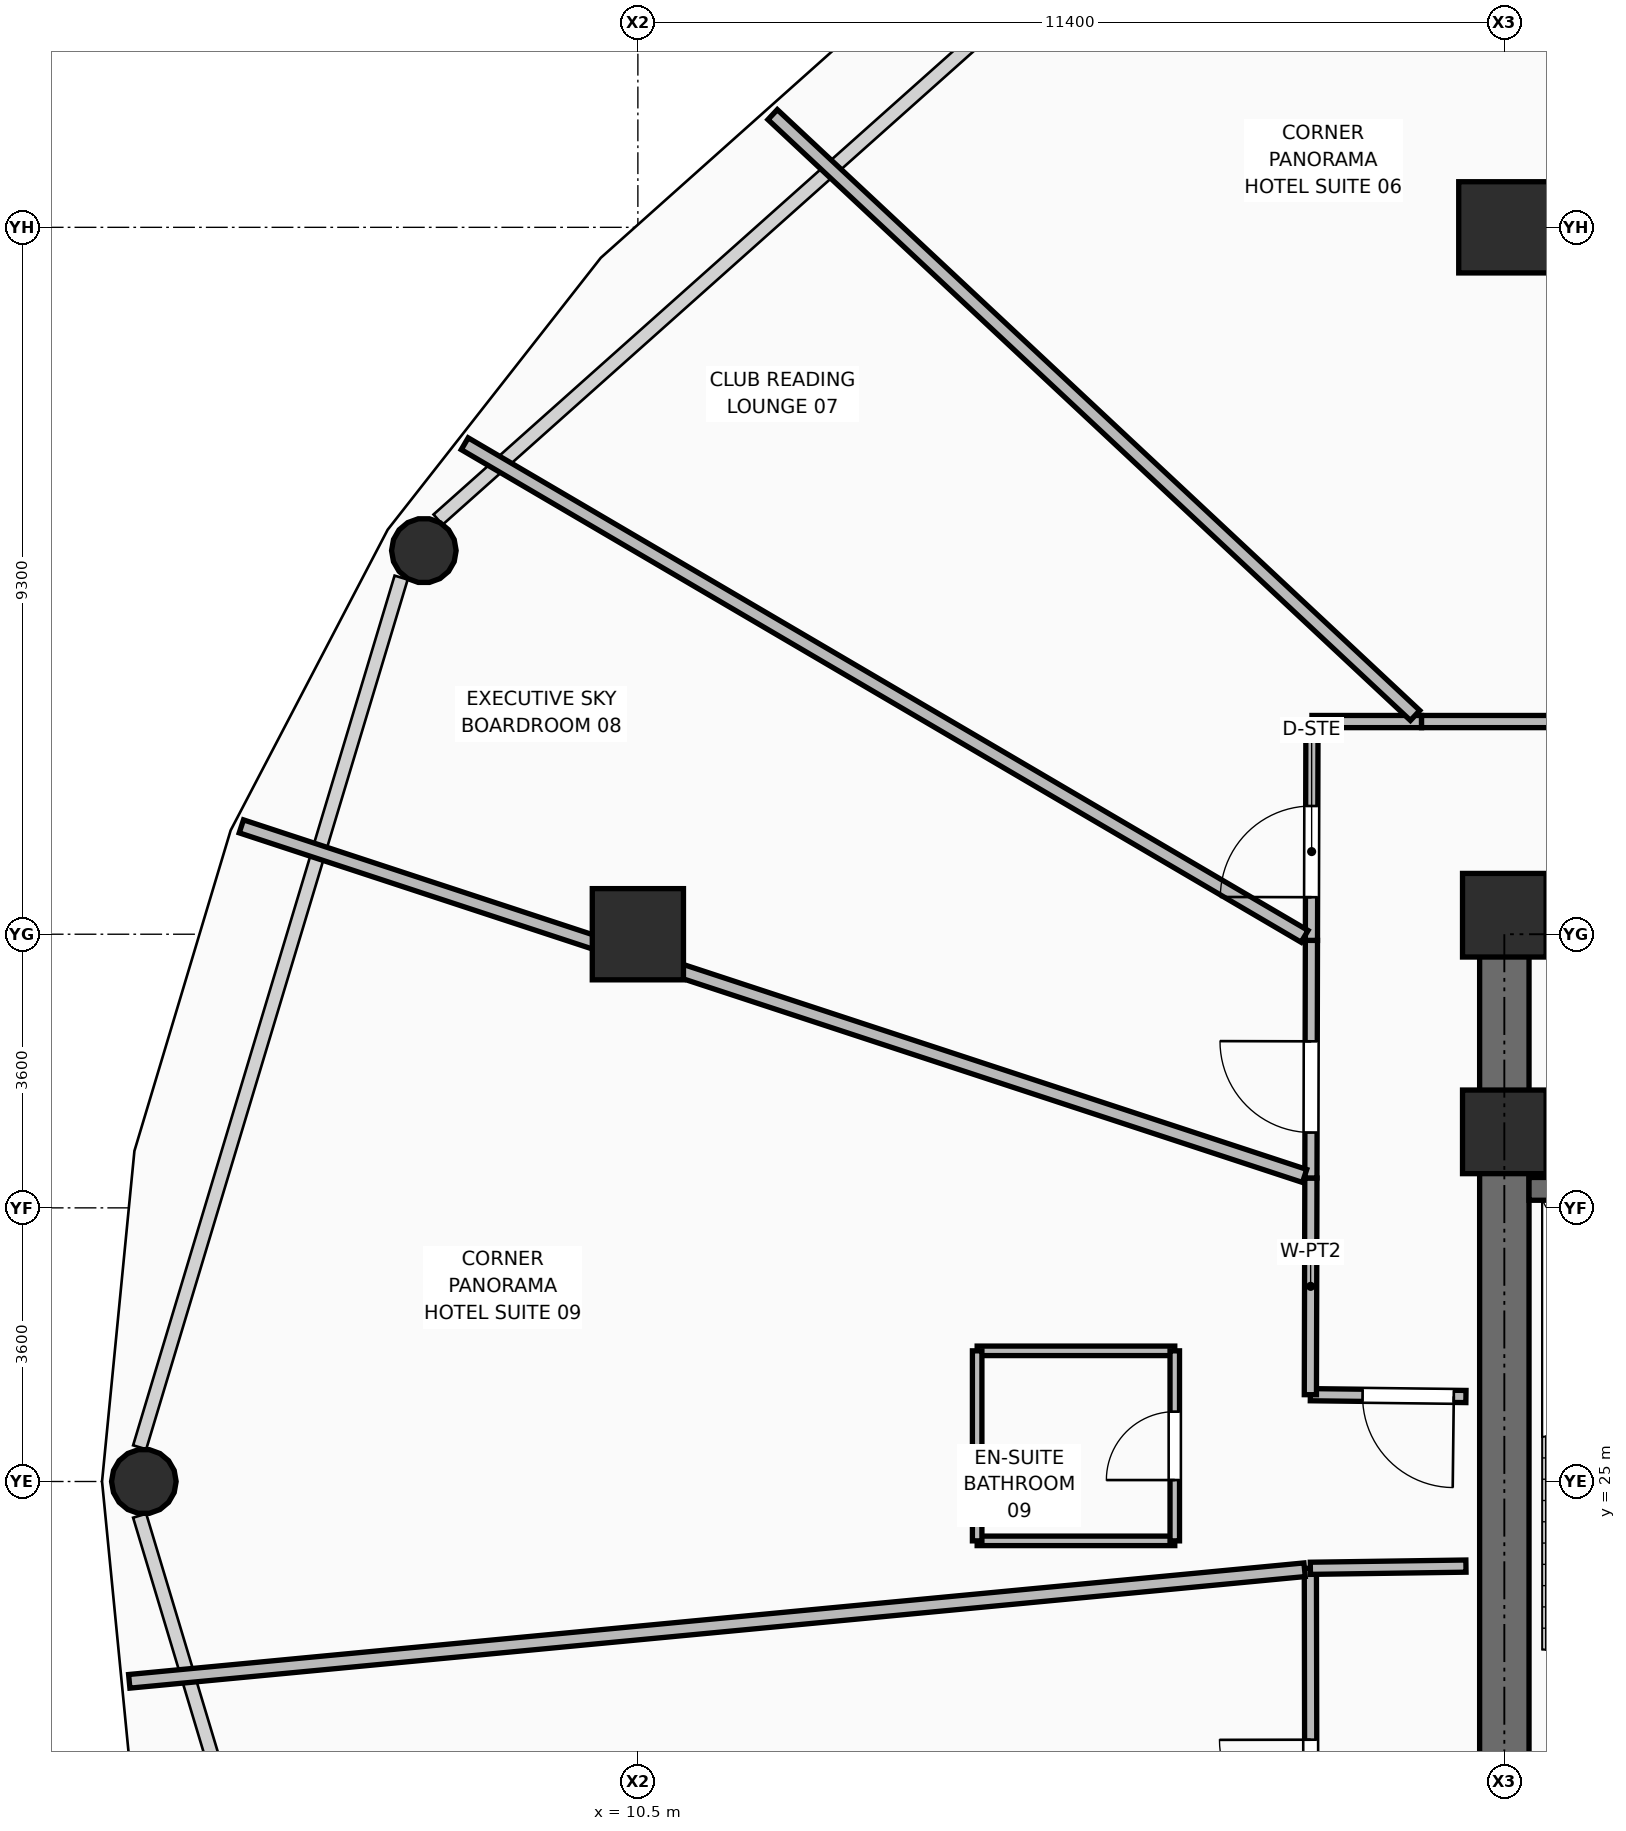
"""IFC4 building model, lengths in metres.
Left out: names, types, materials, properties, quantities, classifications, styles, units other than length and angle.
Written with IfcOpenShell. Run it as: python <this file> out.ifc"""

import sys

from ifc_helpers import new_model, si_unit, direction, frame, frame_2d, origin, origin_2d, place, context, subcontext, project, spatial, rectangle, hollow_rectangle, hollow_circle, extrude, element, fill, save


model = new_model("IFC4")
c1 = context("Model", 3, precision=1e-05, world=origin(), true_north=direction((0.0, 1.0)))
c2 = subcontext(c1, "Body", "Model", "MODEL_VIEW")
j1 = project(units=[si_unit("LENGTHUNIT", "METRE"), si_unit("PLANEANGLEUNIT", "RADIAN")], contexts=[c1])
p1 = place(None, origin())
s1 = spatial("IfcSite", under=j1, at=p1, CompositionType="ELEMENT")
p2 = place(p1, origin())
s2 = spatial("IfcBuilding", under=s1, at=p2, CompositionType="ELEMENT")
p3 = place(p2, frame((0.0, 0.0, 79.5)))
s3 = spatial("IfcBuildingStorey", under=s2, at=p3, CompositionType="ELEMENT", Elevation=79.5)
for number, where, z_axis, x_axis in (
    (1, (21.9, 29.6, 0.0), (0.0, 0.0, 1.0), (1.0, 0.0, 0.0)),
    (2, (21.9, 32.45, 0.0), (0.0, 0.0, 1.0), (1.0, 0.0, 0.0)),
):
    element("IfcColumn", number, at=place(p3, frame(where, z_axis=z_axis, x_axis=x_axis)), inside=s3, PredefinedType="COLUMN", context=c2, shape_type="SweptSolid", body=[
        extrude(rectangle(XDim=1.1, YDim=1.1, at=origin_2d()), origin(), (0.0, 0.0, 1.0), 3.75),
    ])
for number, where, z_axis, x_axis in (
    (3, (10.5, 32.2, 0.0), (0.0, 0.0, 1.0), (1.0, 0.0, 0.0)),
    (4, (21.9, 41.5, 0.0), (0.0, 0.0, 1.0), (1.0, 0.0, 0.0)),
):
    element("IfcColumn", number, at=place(p3, frame(where, z_axis=z_axis, x_axis=x_axis)), inside=s3, PredefinedType="COLUMN", context=c2, shape_type="SweptSolid", body=[
        extrude(hollow_rectangle(XDim=1.2, YDim=1.2, WallThickness=0.045, at=origin_2d()), origin(), (0.0, 0.0, 1.0), 3.75),
    ])
for number, where, z_axis, x_axis in (
    (5, (7.684, 37.247, 0.0), (0.0, 0.0, 1.0), (1.0, 0.0, 0.0)),
    (6, (4.0, 25.0, 0.0), (0.0, 0.0, 1.0), (1.0, 0.0, 0.0)),
):
    element("IfcColumn", number, at=place(p3, frame(where, z_axis=z_axis, x_axis=x_axis)), inside=s3, PredefinedType="COLUMN", context=c2, shape_type="SweptSolid", body=[
        extrude(hollow_circle(Radius=0.425, WallThickness=0.04, at=origin_2d()), origin(), (0.0, 0.0, 1.0), 3.57),
    ])
p4 = place(p3, frame((21.575, 32.45, 0.0), z_axis=(0.0, 0.0, 1.0), x_axis=(1.0, 0.0, 0.0)))
e7 = element("IfcWall", 7, at=p4, inside=s3, PredefinedType="SHEAR", context=c2, shape_type="SweptSolid", body=[
    extrude(rectangle(XDim=19.85, YDim=0.65, at=frame_2d((9.925, 0.0))), origin(), (0.0, 0.0, 1.0), 3.57),
])
p5 = place(p4, frame((2.175, 0.0, 0.0)))
e8 = element("IfcOpeningElement", 8, at=p5, cuts=e7, PredefinedType="OPENING", context=c2, shape_type="SweptSolid", body=[
    extrude(rectangle(XDim=1.1, YDim=2.1, at=frame_2d((0.55, 1.05))), frame((0.0, 0.335, 0.0), z_axis=(0.0, -1.0, 0.0), x_axis=(1.0, 0.0, 0.0)), (0.0, 0.0, 1.0), 0.67),
])
p6 = place(p4, frame((15.565, 0.0, 0.0)))
e9 = element("IfcOpeningElement", 9, at=p6, cuts=e7, PredefinedType="OPENING", context=c2, shape_type="SweptSolid", body=[
    extrude(rectangle(XDim=1.0, YDim=2.1, at=frame_2d((0.5, 1.05))), frame((0.0, 0.335, 0.0), z_axis=(0.0, -1.0, 0.0), x_axis=(1.0, 0.0, 0.0)), (0.0, 0.0, 1.0), 0.67),
])
p7 = place(p4, frame((17.575, 0.0, 0.0)))
e10 = element("IfcOpeningElement", 10, at=p7, cuts=e7, PredefinedType="OPENING", context=c2, shape_type="SweptSolid", body=[
    extrude(rectangle(XDim=0.9, YDim=2.1, at=frame_2d((0.45, 1.05))), frame((0.0, 0.335, 0.0), z_axis=(0.0, -1.0, 0.0), x_axis=(1.0, 0.0, 0.0)), (0.0, 0.0, 1.0), 0.67),
])
p8 = place(p3, frame((21.9, 18.125, 0.0), z_axis=(0.0, 0.0, 1.0), x_axis=(0.0, 1.0, 0.0)))
e11 = element("IfcWall", 11, at=p8, inside=s3, PredefinedType="SHEAR", context=c2, shape_type="SweptSolid", body=[
    extrude(rectangle(XDim=14.0, YDim=0.65, at=frame_2d((7.0, 0.0))), origin(), (0.0, 0.0, 1.0), 3.57),
])
p9 = place(p3, frame((22.225, 28.85, 0.0), z_axis=(0.0, 0.0, 1.0), x_axis=(1.0, 0.0, 0.0)))
e12 = element("IfcWall", 12, at=p9, inside=s3, PredefinedType="SHEAR", context=c2, shape_type="SweptSolid", body=[
    extrude(rectangle(XDim=3.515, YDim=0.3, at=frame_2d((1.757, 0.0))), origin(), (0.0, 0.0, 1.0), 3.57),
])
p10 = place(p3, frame((21.395, 26.118, 0.0), z_axis=(0.0, 0.0, 1.0), x_axis=(-0.999930307049, 0.011805975003, 0.0)))
e13 = element("IfcWall", 13, at=p10, inside=s3, PredefinedType="PARTITIONING", context=c2, shape_type="SweptSolid", body=[
    extrude(rectangle(XDim=2.047, YDim=0.16, at=frame_2d((1.024, 0.0))), origin(), (0.0, 0.0, 1.0), 3.55),
])
p11 = place(p10, frame((0.16, 0.0, 0.0)))
e14 = element("IfcOpeningElement", 14, at=p11, cuts=e13, PredefinedType="OPENING", context=c2, shape_type="SweptSolid", body=[
    extrude(rectangle(XDim=1.2, YDim=2.1, at=frame_2d((0.6, 1.05))), frame((0.0, 0.09, 0.0), z_axis=(0.0, -1.0, 0.0), x_axis=(1.0, 0.0, 0.0)), (0.0, 0.0, 1.0), 0.18),
])
p12 = place(p3, frame((19.348, 26.142, 0.0), z_axis=(0.0, 0.0, 1.0), x_axis=(0.002483506942, 0.999996916092, 0.0)))
e15 = element("IfcWall", 15, at=p12, inside=s3, PredefinedType="PARTITIONING", context=c2, shape_type="SweptSolid", body=[
    extrude(rectangle(XDim=2.851, YDim=0.16, at=frame_2d((1.425, 0.0))), origin(), (0.0, 0.0, 1.0), 3.55),
])
p13 = place(p3, frame((19.355, 28.993, 0.0), z_axis=(0.0, 0.0, 1.0), x_axis=(0.002264911404, 0.999997435085, 0.0)))
e16 = element("IfcWall", 16, at=p13, inside=s3, PredefinedType="PARTITIONING", context=c2, shape_type="SweptSolid", body=[
    extrude(rectangle(XDim=3.126, YDim=0.16, at=frame_2d((1.563, 0.0))), origin(), (0.0, 0.0, 1.0), 3.55),
])
p14 = place(p13, frame((0.598, 0.0, 0.0)))
e17 = element("IfcOpeningElement", 17, at=p14, cuts=e16, PredefinedType="OPENING", context=c2, shape_type="SweptSolid", body=[
    extrude(rectangle(XDim=1.2, YDim=2.1, at=frame_2d((0.6, 1.05))), frame((0.0, 0.09, 0.0), z_axis=(0.0, -1.0, 0.0), x_axis=(1.0, 0.0, 0.0)), (0.0, 0.0, 1.0), 0.18),
])
p15 = place(p3, frame((19.362, 32.119, 0.0), z_axis=(0.0, 0.0, 1.0), x_axis=(0.002374283141, 0.999997181386, 0.0)))
e18 = element("IfcWall", 18, at=p15, inside=s3, PredefinedType="PARTITIONING", context=c2, shape_type="SweptSolid", body=[
    extrude(rectangle(XDim=2.879, YDim=0.16, at=frame_2d((1.439, 0.0))), origin(), (0.0, 0.0, 1.0), 2.928),
])
p16 = place(p15, frame((0.568, 0.0, 0.0)))
e19 = element("IfcOpeningElement", 19, at=p16, cuts=e18, PredefinedType="OPENING", context=c2, shape_type="SweptSolid", body=[
    extrude(rectangle(XDim=1.2, YDim=2.1, at=frame_2d((0.6, 1.05))), frame((0.0, 0.09, 0.0), z_axis=(0.0, -1.0, 0.0), x_axis=(1.0, 0.0, 0.0)), (0.0, 0.0, 1.0), 0.18),
])
p17 = place(p3, frame((19.369, 34.998, 0.0), z_axis=(0.0, 0.0, 1.0), x_axis=(1.0, 0.0, 0.0)))
e20 = element("IfcWall", 20, at=p17, inside=s3, PredefinedType="PARTITIONING", context=c2, shape_type="SweptSolid", body=[
    extrude(rectangle(XDim=1.442, YDim=0.16, at=frame_2d((0.721, 0.0))), origin(), (0.0, 0.0, 1.0), 3.55),
])
p18 = place(p3, frame((20.811, 34.998, 0.0), z_axis=(0.0, 0.0, 1.0), x_axis=(1.0, 0.0, 0.0)))
e21 = element("IfcWall", 21, at=p18, inside=s3, PredefinedType="PARTITIONING", context=c2, shape_type="SweptSolid", body=[
    extrude(rectangle(XDim=7.092, YDim=0.16, at=frame_2d((3.546, 0.0))), origin(), (0.0, 0.0, 1.0), 2.928),
])
p19 = place(p18, frame((2.799, 0.0, 0.0)))
e22 = element("IfcOpeningElement", 22, at=p19, cuts=e21, PredefinedType="OPENING", context=c2, shape_type="SweptSolid", body=[
    extrude(rectangle(XDim=1.2, YDim=2.1, at=frame_2d((0.6, 1.05))), frame((0.0, 0.09, 0.0), z_axis=(0.0, -1.0, 0.0), x_axis=(1.0, 0.0, 0.0)), (0.0, 0.0, 1.0), 0.18),
])
p20 = place(p3, frame((19.358, 18.147, 0.0), z_axis=(0.0, 0.0, 1.0), x_axis=(-0.001752733286, 0.999998463962, 0.0)))
e23 = element("IfcWall", 23, at=p20, inside=s3, PredefinedType="PARTITIONING", context=c2, shape_type="SweptSolid", body=[
    extrude(rectangle(XDim=5.711, YDim=0.16, at=frame_2d((2.855, 0.0))), origin(), (0.0, 0.0, 1.0), 2.928),
])
p21 = place(p20, frame((2.256, 0.0, 0.0)))
e24 = element("IfcOpeningElement", 24, at=p21, cuts=e23, PredefinedType="OPENING", context=c2, shape_type="SweptSolid", body=[
    extrude(rectangle(XDim=1.2, YDim=2.1, at=frame_2d((0.6, 1.05))), frame((0.0, 0.09, 0.0), z_axis=(0.0, -1.0, 0.0), x_axis=(1.0, 0.0, 0.0)), (0.0, 0.0, 1.0), 0.18),
])
p22 = place(p3, frame((19.348, 23.858, 0.0), z_axis=(0.0, 0.0, 1.0), x_axis=(0.999899308643, 0.014190580528, 0.0)))
e25 = element("IfcWall", 25, at=p22, inside=s3, PredefinedType="PARTITIONING", context=c2, shape_type="SweptSolid", body=[
    extrude(rectangle(XDim=2.047, YDim=0.16, at=frame_2d((1.024, 0.0))), origin(), (0.0, 0.0, 1.0), 3.55),
])
p23 = place(p3, frame((20.726, 35.078, 0.0), z_axis=(0.0, 0.0, 1.0), x_axis=(-0.730389203883, 0.683031193176, 0.0)))
e26 = element("IfcWall", 26, at=p23, inside=s3, PredefinedType="PARTITIONING", context=c2, shape_type="SweptSolid", body=[
    extrude(rectangle(XDim=11.573, YDim=0.18, at=frame_2d((5.787, 0.0))), origin(), (0.0, 0.0, 1.0), 2.775),
])
p24 = place(p3, frame((19.272, 32.172, 0.0), z_axis=(0.0, 0.0, 1.0), x_axis=(-0.862584123078, 0.505913659248, 0.0)))
e27 = element("IfcWall", 27, at=p24, inside=s3, PredefinedType="PARTITIONING", context=c2, shape_type="SweptSolid", body=[
    extrude(rectangle(XDim=12.81, YDim=0.18, at=frame_2d((6.405, 0.0))), origin(), (0.0, 0.0, 1.0), 2.775),
])
p25 = place(p3, frame((19.272, 29.02, 0.0), z_axis=(0.0, 0.0, 1.0), x_axis=(-0.949981656655, 0.312305702829, 0.0)))
e28 = element("IfcWall", 28, at=p25, inside=s3, PredefinedType="PARTITIONING", context=c2, shape_type="SweptSolid", body=[
    extrude(rectangle(XDim=14.726, YDim=0.18, at=frame_2d((7.363, 0.0))), origin(), (0.0, 0.0, 1.0), 2.775),
])
p26 = place(p3, frame((19.272, 23.839, 0.0), z_axis=(0.0, 0.0, 1.0), x_axis=(-0.995524176843, -0.094507213062, 0.0)))
e29 = element("IfcWall", 29, at=p26, inside=s3, PredefinedType="PARTITIONING", context=c2, shape_type="SweptSolid", body=[
    extrude(rectangle(XDim=15.533, YDim=0.18, at=frame_2d((7.767, 0.0))), origin(), (0.0, 0.0, 1.0), 2.775),
])
for number, where, z_axis, x_axis in (
    (30, (14.964, 24.219, 0.0), (0.0, 0.0, 1.0), (1.0, 0.0, 0.0)),
    (31, (14.964, 26.719, 0.0), (0.0, 0.0, 1.0), (1.0, 0.0, 0.0)),
):
    element("IfcWall", number, at=place(p3, frame(where, z_axis=z_axis, x_axis=x_axis)), inside=s3, PredefinedType="PARTITIONING", context=c2, shape_type="SweptSolid", body=[
        extrude(rectangle(XDim=2.6, YDim=0.125, at=frame_2d((1.3, 0.0))), origin(), (0.0, 0.0, 1.0), 3.55),
    ])
p27 = place(p3, frame((14.964, 24.219, 0.0), z_axis=(0.0, 0.0, 1.0), x_axis=(0.0, 1.0, 0.0)))
e32 = element("IfcWall", 32, at=p27, inside=s3, PredefinedType="PARTITIONING", context=c2, shape_type="SweptSolid", body=[
    extrude(rectangle(XDim=2.5, YDim=0.125, at=frame_2d((1.25, 0.0))), origin(), (0.0, 0.0, 1.0), 3.55),
])
p28 = place(p3, frame((17.564, 24.219, 0.0), z_axis=(0.0, 0.0, 1.0), x_axis=(0.0, 1.0, 0.0)))
e33 = element("IfcWall", 33, at=p28, inside=s3, PredefinedType="PARTITIONING", context=c2, shape_type="SweptSolid", body=[
    extrude(rectangle(XDim=2.5, YDim=0.125, at=frame_2d((1.25, 0.0))), origin(), (0.0, 0.0, 1.0), 3.55),
])
p29 = place(p28, frame((0.8, 0.0, 0.0)))
e34 = element("IfcOpeningElement", 34, at=p29, cuts=e33, PredefinedType="OPENING", context=c2, shape_type="SweptSolid", body=[
    extrude(rectangle(XDim=0.9, YDim=2.1, at=frame_2d((0.45, 1.05))), frame((0.0, 0.073, 0.0), z_axis=(0.0, -1.0, 0.0), x_axis=(1.0, 0.0, 0.0)), (0.0, 0.0, 1.0), 0.145),
])
p30 = place(p16, origin())
e35 = element("IfcDoor", 35, at=p30, inside=s3, OperationType="SINGLE_SWING_LEFT", PredefinedType="DOOR", context=c2, shape_type="SweptSolid", body=[
    extrude(rectangle(XDim=1.2, YDim=2.1, at=frame_2d((0.6, 1.05))), frame((0.0, 0.025, 0.0), z_axis=(0.0, -1.0, 0.0), x_axis=(1.0, 0.0, 0.0)), (0.0, 0.0, 1.0), 0.05),
])
fill(e19, e35)
p31 = place(p14, origin())
e36 = element("IfcDoor", 36, at=p31, inside=s3, OperationType="SINGLE_SWING_RIGHT", PredefinedType="DOOR", context=c2, shape_type="SweptSolid", body=[
    extrude(rectangle(XDim=1.2, YDim=2.1, at=frame_2d((0.6, 1.05))), frame((0.0, 0.025, 0.0), z_axis=(0.0, -1.0, 0.0), x_axis=(1.0, 0.0, 0.0)), (0.0, 0.0, 1.0), 0.05),
])
fill(e17, e36)
p32 = place(p29, origin())
e37 = element("IfcDoor", 37, at=p32, inside=s3, OperationType="SINGLE_SWING_LEFT", PredefinedType="DOOR", context=c2, shape_type="SweptSolid", body=[
    extrude(rectangle(XDim=0.9, YDim=2.1, at=frame_2d((0.45, 1.05))), frame((0.0, 0.025, 0.0), z_axis=(0.0, -1.0, 0.0), x_axis=(1.0, 0.0, 0.0)), (0.0, 0.0, 1.0), 0.05),
])
fill(e34, e37)
p33 = place(p11, origin())
e38 = element("IfcDoor", 38, at=p33, inside=s3, OperationType="SINGLE_SWING_LEFT", PredefinedType="DOOR", context=c2, shape_type="SweptSolid", body=[
    extrude(rectangle(XDim=1.2, YDim=2.1, at=frame_2d((0.6, 1.05))), frame((0.0, 0.025, 0.0), z_axis=(0.0, -1.0, 0.0), x_axis=(1.0, 0.0, 0.0)), (0.0, 0.0, 1.0), 0.05),
])
fill(e14, e38)
p34 = place(p21, origin())
e39 = element("IfcDoor", 39, at=p34, inside=s3, OperationType="SINGLE_SWING_RIGHT", PredefinedType="DOOR", context=c2, shape_type="SweptSolid", body=[
    extrude(rectangle(XDim=1.2, YDim=2.1, at=frame_2d((0.6, 1.05))), frame((0.0, 0.025, 0.0), z_axis=(0.0, -1.0, 0.0), x_axis=(1.0, 0.0, 0.0)), (0.0, 0.0, 1.0), 0.05),
])
fill(e24, e39)
save(model, sys.argv[1])
